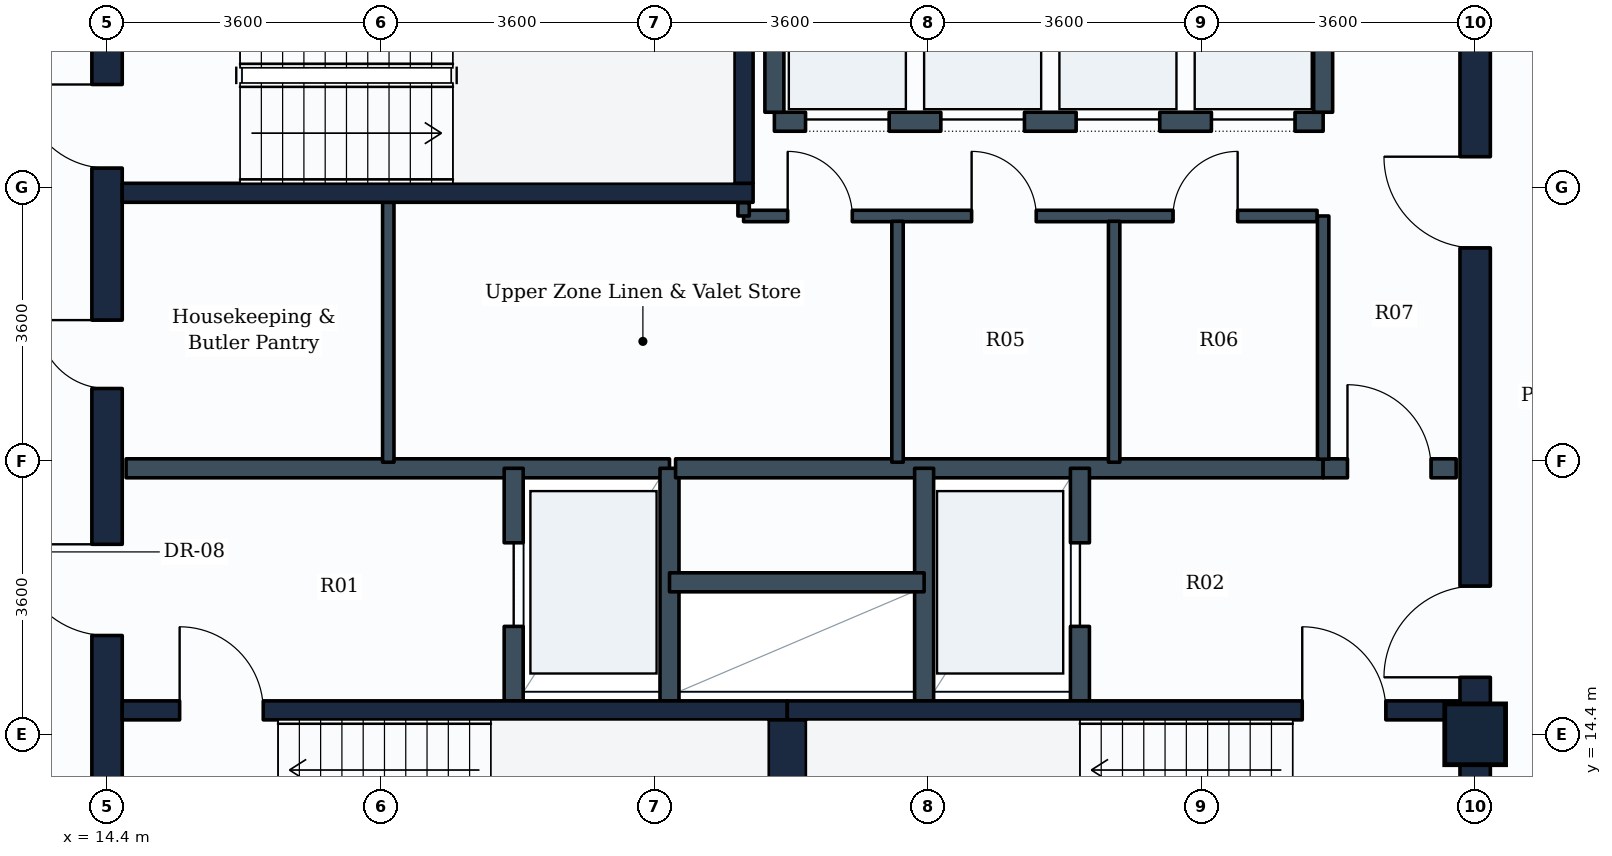
"""IFC4 building model, lengths in metres.
Left out: names, types, materials, properties, quantities, classifications, styles, units other than length and angle.
Written with IfcOpenShell. Run it as: python <this file> out.ifc"""

import sys

from ifc_helpers import new_model, si_unit, direction, frame, frame_2d, origin, origin_2d, place, context, subcontext, project, spatial, rectangle, extrude, element, fill, save


model = new_model("IFC4")
c1 = context("Model", 3, precision=1e-05, world=origin(), true_north=direction((0.0, 1.0)))
c2 = subcontext(c1, "Body", "Model", "MODEL_VIEW")
j1 = project(units=[si_unit("LENGTHUNIT", "METRE"), si_unit("PLANEANGLEUNIT", "RADIAN")], contexts=[c1])
p1 = place(None, origin())
s1 = spatial("IfcSite", under=j1, at=p1, CompositionType="ELEMENT")
p2 = place(p1, origin())
s2 = spatial("IfcBuilding", under=s1, at=p2, CompositionType="ELEMENT")
p3 = place(p2, frame((0.0, 0.0, 288.2)))
s3 = spatial("IfcBuildingStorey", under=s2, at=p3, CompositionType="ELEMENT", Elevation=288.2)
p4 = place(p3, frame((32.4, 14.4, 0.0), z_axis=(0.0, 0.0, 1.0), x_axis=(1.0, 0.0, 0.0)))
e1 = element("IfcColumn", 1, at=p4, inside=s3, PredefinedType="COLUMN", context=c2, shape_type="SweptSolid", body=[
    extrude(rectangle(XDim=0.8, YDim=0.8, at=origin_2d()), origin(), (0.0, 0.0, 1.0), 3.6),
])
p5 = place(p3, frame((14.4, 10.8, 0.0), z_axis=(0.0, 0.0, 1.0), x_axis=(0.0, 1.0, 0.0)))
e2 = element("IfcWall", 2, at=p5, inside=s3, PredefinedType="SHEAR", context=c2, shape_type="SweptSolid", body=[
    extrude(rectangle(XDim=14.4, YDim=0.4, at=frame_2d((7.2, 0.0))), origin(), (0.0, 0.0, 1.0), 3.35),
])
p6 = place(p5, frame((11.05, 0.0, 0.0)))
e3 = element("IfcOpeningElement", 3, at=p6, cuts=e2, PredefinedType="OPENING", context=c2, shape_type="SweptSolid", body=[
    extrude(rectangle(XDim=1.1, YDim=2.1, at=frame_2d((0.55, 1.05))), frame((0.0, 0.21, 0.0), z_axis=(0.0, -1.0, 0.0), x_axis=(1.0, 0.0, 0.0)), (0.0, 0.0, 1.0), 0.42),
])
p7 = place(p5, frame((4.9, 0.0, 0.0)))
e4 = element("IfcOpeningElement", 4, at=p7, cuts=e2, PredefinedType="OPENING", context=c2, shape_type="SweptSolid", body=[
    extrude(rectangle(XDim=1.2, YDim=2.1, at=frame_2d((0.6, 1.05))), frame((0.0, 0.21, 0.0), z_axis=(0.0, -1.0, 0.0), x_axis=(1.0, 0.0, 0.0)), (0.0, 0.0, 1.0), 0.42),
])
p8 = place(p5, frame((8.15, 0.0, 0.0)))
e5 = element("IfcOpeningElement", 5, at=p8, cuts=e2, PredefinedType="OPENING", context=c2, shape_type="SweptSolid", body=[
    extrude(rectangle(XDim=0.9, YDim=2.1, at=frame_2d((0.45, 1.05))), frame((0.0, 0.21, 0.0), z_axis=(0.0, -1.0, 0.0), x_axis=(1.0, 0.0, 0.0)), (0.0, 0.0, 1.0), 0.42),
])
p9 = place(p3, frame((32.4, 10.8, 0.0), z_axis=(0.0, 0.0, 1.0), x_axis=(0.0, 1.0, 0.0)))
e6 = element("IfcWall", 6, at=p9, inside=s3, PredefinedType="SHEAR", context=c2, shape_type="SweptSolid", body=[
    extrude(rectangle(XDim=14.4, YDim=0.4, at=frame_2d((7.2, 0.0))), origin(), (0.0, 0.0, 1.0), 3.35),
])
p10 = place(p9, frame((4.35, 0.0, 0.0)))
e7 = element("IfcOpeningElement", 7, at=p10, cuts=e6, PredefinedType="OPENING", context=c2, shape_type="SweptSolid", body=[
    extrude(rectangle(XDim=1.2, YDim=2.1, at=frame_2d((0.6, 1.05))), frame((0.0, 0.21, 0.0), z_axis=(0.0, -1.0, 0.0), x_axis=(1.0, 0.0, 0.0)), (0.0, 0.0, 1.0), 0.42),
])
p11 = place(p9, frame((10.0, 0.0, 0.0)))
e8 = element("IfcOpeningElement", 8, at=p11, cuts=e6, PredefinedType="OPENING", context=c2, shape_type="SweptSolid", body=[
    extrude(rectangle(XDim=1.2, YDim=2.1, at=frame_2d((0.6, 1.05))), frame((0.0, 0.21, 0.0), z_axis=(0.0, -1.0, 0.0), x_axis=(1.0, 0.0, 0.0)), (0.0, 0.0, 1.0), 0.42),
])
p12 = place(p3, frame((14.6, 14.715, 0.0), z_axis=(0.0, 0.0, 1.0), x_axis=(1.0, 0.0, 0.0)))
e9 = element("IfcWall", 9, at=p12, inside=s3, PredefinedType="SHEAR", context=c2, shape_type="SweptSolid", body=[
    extrude(rectangle(XDim=8.75, YDim=0.25, at=frame_2d((4.375, 0.0))), origin(), (0.0, 0.0, 1.0), 3.35),
])
p13 = place(p12, frame((0.755, 0.0, 0.0)))
e10 = element("IfcOpeningElement", 10, at=p13, cuts=e9, PredefinedType="OPENING", context=c2, shape_type="SweptSolid", body=[
    extrude(rectangle(XDim=1.1, YDim=2.1, at=frame_2d((0.55, 1.05))), frame((0.0, 0.135, 0.0), z_axis=(0.0, -1.0, 0.0), x_axis=(1.0, 0.0, 0.0)), (0.0, 0.0, 1.0), 0.27),
])
p14 = place(p3, frame((23.35, 14.715, 0.0), z_axis=(0.0, 0.0, 1.0), x_axis=(1.0, 0.0, 0.0)))
e11 = element("IfcWall", 11, at=p14, inside=s3, PredefinedType="SHEAR", context=c2, shape_type="SweptSolid", body=[
    extrude(rectangle(XDim=8.85, YDim=0.25, at=frame_2d((4.425, 0.0))), origin(), (0.0, 0.0, 1.0), 3.35),
])
p15 = place(p14, frame((6.775, 0.0, 0.0)))
e12 = element("IfcOpeningElement", 12, at=p15, cuts=e11, PredefinedType="OPENING", context=c2, shape_type="SweptSolid", body=[
    extrude(rectangle(XDim=1.1, YDim=2.1, at=frame_2d((0.55, 1.05))), frame((0.0, 0.135, 0.0), z_axis=(0.0, -1.0, 0.0), x_axis=(1.0, 0.0, 0.0)), (0.0, 0.0, 1.0), 0.27),
])
p16 = place(p3, frame((23.35, 11.75, 0.0), z_axis=(0.0, 0.0, 1.0), x_axis=(0.0, 1.0, 0.0)))
e13 = element("IfcWall", 13, at=p16, inside=s3, PredefinedType="SHEAR", context=c2, shape_type="SweptSolid", body=[
    extrude(rectangle(XDim=2.84, YDim=0.5, at=frame_2d((1.42, 0.0))), origin(), (0.0, 0.0, 1.0), 3.35),
])
p17 = place(p3, frame((14.6, 21.525, 0.0), z_axis=(0.0, 0.0, 1.0), x_axis=(1.0, 0.0, 0.0)))
e14 = element("IfcWall", 14, at=p17, inside=s3, PredefinedType="SHEAR", context=c2, shape_type="SweptSolid", body=[
    extrude(rectangle(XDim=8.3, YDim=0.25, at=frame_2d((4.15, 0.0))), origin(), (0.0, 0.0, 1.0), 3.35),
])
p18 = place(p3, frame((22.775, 21.65, 0.0), z_axis=(0.0, 0.0, 1.0), x_axis=(0.0, 1.0, 0.0)))
e15 = element("IfcWall", 15, at=p18, inside=s3, PredefinedType="SHEAR", context=c2, shape_type="SweptSolid", body=[
    extrude(rectangle(XDim=2.84, YDim=0.25, at=frame_2d((1.42, 0.0))), origin(), (0.0, 0.0, 1.0), 3.35),
])
p19 = place(p3, frame((14.65, 17.9, 0.0), z_axis=(0.0, 0.0, 1.0), x_axis=(1.0, 0.0, 0.0)))
e16 = element("IfcWall", 16, at=p19, inside=s3, PredefinedType="PARTITIONING", context=c2, shape_type="SweptSolid", body=[
    extrude(rectangle(XDim=7.15, YDim=0.25, at=frame_2d((3.575, 0.0))), origin(), (0.0, 0.0, 1.0), 3.335),
])
p20 = place(p3, frame((19.75, 14.84, 0.0), z_axis=(0.0, 0.0, 1.0), x_axis=(0.0, 1.0, 0.0)))
e17 = element("IfcWall", 17, at=p20, inside=s3, PredefinedType="PARTITIONING", context=c2, shape_type="SweptSolid", body=[
    extrude(rectangle(XDim=3.06, YDim=0.25, at=frame_2d((1.53, 0.0))), origin(), (0.0, 0.0, 1.0), 3.335),
])
p21 = place(p20, frame((0.98, 0.0, 0.0)))
e18 = element("IfcOpeningElement", 18, at=p21, cuts=e17, PredefinedType="OPENING", context=c2, shape_type="SweptSolid", body=[
    extrude(rectangle(XDim=1.1, YDim=2.1, at=frame_2d((0.55, 1.05))), frame((0.0, 0.135, 0.0), z_axis=(0.0, -1.0, 0.0), x_axis=(1.0, 0.0, 0.0)), (0.0, 0.0, 1.0), 0.27),
])
p22 = place(p3, frame((21.8, 14.84, 0.0), z_axis=(0.0, 0.0, 1.0), x_axis=(0.0, 1.0, 0.0)))
e19 = element("IfcWall", 19, at=p22, inside=s3, PredefinedType="PARTITIONING", context=c2, shape_type="SweptSolid", body=[
    extrude(rectangle(XDim=3.06, YDim=0.25, at=frame_2d((1.53, 0.0))), origin(), (0.0, 0.0, 1.0), 3.335),
])
p23 = place(p3, frame((21.88, 17.9, 0.0), z_axis=(0.0, 0.0, 1.0), x_axis=(1.0, 0.0, 0.0)))
e20 = element("IfcWall", 20, at=p23, inside=s3, PredefinedType="PARTITIONING", context=c2, shape_type="SweptSolid", body=[
    extrude(rectangle(XDim=8.52, YDim=0.25, at=frame_2d((4.26, 0.0))), origin(), (0.0, 0.0, 1.0), 3.335),
])
p24 = place(p3, frame((30.4, 17.9, 0.0), z_axis=(0.0, 0.0, 1.0), x_axis=(1.0, 0.0, 0.0)))
e21 = element("IfcWall", 21, at=p24, inside=s3, PredefinedType="PARTITIONING", context=c2, shape_type="SweptSolid", body=[
    extrude(rectangle(XDim=1.75, YDim=0.25, at=frame_2d((0.875, 0.0))), origin(), (0.0, 0.0, 1.0), 3.335),
])
p25 = place(p24, frame((0.32, 0.0, 0.0)))
e22 = element("IfcOpeningElement", 22, at=p25, cuts=e21, PredefinedType="OPENING", context=c2, shape_type="SweptSolid", body=[
    extrude(rectangle(XDim=1.1, YDim=2.1, at=frame_2d((0.55, 1.05))), frame((0.0, 0.135, 0.0), z_axis=(0.0, -1.0, 0.0), x_axis=(1.0, 0.0, 0.0)), (0.0, 0.0, 1.0), 0.27),
])
p26 = place(p3, frame((25.15, 14.84, 0.0), z_axis=(0.0, 0.0, 1.0), x_axis=(0.0, 1.0, 0.0)))
e23 = element("IfcWall", 23, at=p26, inside=s3, PredefinedType="PARTITIONING", context=c2, shape_type="SweptSolid", body=[
    extrude(rectangle(XDim=3.06, YDim=0.25, at=frame_2d((1.53, 0.0))), origin(), (0.0, 0.0, 1.0), 3.335),
])
p27 = place(p3, frame((27.2, 14.84, 0.0), z_axis=(0.0, 0.0, 1.0), x_axis=(0.0, 1.0, 0.0)))
e24 = element("IfcWall", 24, at=p27, inside=s3, PredefinedType="PARTITIONING", context=c2, shape_type="SweptSolid", body=[
    extrude(rectangle(XDim=3.06, YDim=0.25, at=frame_2d((1.53, 0.0))), origin(), (0.0, 0.0, 1.0), 3.335),
])
p28 = place(p27, frame((0.98, 0.0, 0.0)))
e25 = element("IfcOpeningElement", 25, at=p28, cuts=e24, PredefinedType="OPENING", context=c2, shape_type="SweptSolid", body=[
    extrude(rectangle(XDim=1.1, YDim=2.1, at=frame_2d((0.55, 1.05))), frame((0.0, 0.135, 0.0), z_axis=(0.0, -1.0, 0.0), x_axis=(1.0, 0.0, 0.0)), (0.0, 0.0, 1.0), 0.27),
])
p29 = place(p3, frame((21.8, 16.4, 0.0), z_axis=(0.0, 0.0, 1.0), x_axis=(1.0, 0.0, 0.0)))
e26 = element("IfcWall", 26, at=p29, inside=s3, PredefinedType="PARTITIONING", context=c2, shape_type="SweptSolid", body=[
    extrude(rectangle(XDim=3.35, YDim=0.25, at=frame_2d((1.675, 0.0))), origin(), (0.0, 0.0, 1.0), 3.335),
])
p30 = place(p3, frame((23.18, 22.46, 0.0), z_axis=(0.0, 0.0, 1.0), x_axis=(1.0, 0.0, 0.0)))
e27 = element("IfcWall", 27, at=p30, inside=s3, PredefinedType="PARTITIONING", context=c2, shape_type="SweptSolid", body=[
    extrude(rectangle(XDim=7.22, YDim=0.25, at=frame_2d((3.61, 0.0))), origin(), (0.0, 0.0, 1.0), 3.335),
])
p31 = place(p30, frame((0.41, 0.0, 0.0)))
e28 = element("IfcOpeningElement", 28, at=p31, cuts=e27, PredefinedType="OPENING", context=c2, shape_type="SweptSolid", body=[
    extrude(rectangle(XDim=1.1, YDim=2.1, at=frame_2d((0.55, 1.05))), frame((0.0, 0.135, 0.0), z_axis=(0.0, -1.0, 0.0), x_axis=(1.0, 0.0, 0.0)), (0.0, 0.0, 1.0), 0.27),
])
p32 = place(p30, frame((2.19, 0.0, 0.0)))
e29 = element("IfcOpeningElement", 29, at=p32, cuts=e27, PredefinedType="OPENING", context=c2, shape_type="SweptSolid", body=[
    extrude(rectangle(XDim=1.1, YDim=2.1, at=frame_2d((0.55, 1.05))), frame((0.0, 0.135, 0.0), z_axis=(0.0, -1.0, 0.0), x_axis=(1.0, 0.0, 0.0)), (0.0, 0.0, 1.0), 0.27),
])
p33 = place(p30, frame((3.97, 0.0, 0.0)))
e30 = element("IfcOpeningElement", 30, at=p33, cuts=e27, PredefinedType="OPENING", context=c2, shape_type="SweptSolid", body=[
    extrude(rectangle(XDim=1.1, YDim=2.1, at=frame_2d((0.55, 1.05))), frame((0.0, 0.135, 0.0), z_axis=(0.0, -1.0, 0.0), x_axis=(1.0, 0.0, 0.0)), (0.0, 0.0, 1.0), 0.27),
])
p34 = place(p30, frame((5.75, 0.0, 0.0)))
e31 = element("IfcOpeningElement", 31, at=p34, cuts=e27, PredefinedType="OPENING", context=c2, shape_type="SweptSolid", body=[
    extrude(rectangle(XDim=1.1, YDim=2.1, at=frame_2d((0.55, 1.05))), frame((0.0, 0.135, 0.0), z_axis=(0.0, -1.0, 0.0), x_axis=(1.0, 0.0, 0.0)), (0.0, 0.0, 1.0), 0.27),
])
for number, where, z_axis, x_axis in (
    (32, (23.18, 22.585, 0.0), (0.0, 0.0, 1.0), (0.0, 1.0, 0.0)),
    (33, (30.4, 22.585, 0.0), (0.0, 0.0, 1.0), (0.0, 1.0, 0.0)),
):
    element("IfcWall", number, at=place(p3, frame(where, z_axis=z_axis, x_axis=x_axis)), inside=s3, PredefinedType="PARTITIONING", context=c2, shape_type="SweptSolid", body=[
        extrude(rectangle(XDim=2.315, YDim=0.25, at=frame_2d((1.157, 0.0))), origin(), (0.0, 0.0, 1.0), 3.335),
    ])
p35 = place(p3, frame((22.775, 21.22, 0.0), z_axis=(0.0, 0.0, 1.0), x_axis=(1.0, 0.0, 0.0)))
e34 = element("IfcWall", 34, at=p35, inside=s3, PredefinedType="PARTITIONING", context=c2, shape_type="SweptSolid", body=[
    extrude(rectangle(XDim=7.545, YDim=0.15, at=frame_2d((3.772, 0.0))), origin(), (0.0, 0.0, 1.0), 3.335),
])
p36 = place(p35, frame((0.58, 0.0, 0.0)))
e35 = element("IfcOpeningElement", 35, at=p36, cuts=e34, PredefinedType="OPENING", context=c2, shape_type="SweptSolid", body=[
    extrude(rectangle(XDim=0.85, YDim=2.1, at=frame_2d((0.425, 1.05))), frame((0.0, 0.085, 0.0), z_axis=(0.0, -1.0, 0.0), x_axis=(1.0, 0.0, 0.0)), (0.0, 0.0, 1.0), 0.17),
])
p37 = place(p35, frame((3.0, 0.0, 0.0)))
e36 = element("IfcOpeningElement", 36, at=p37, cuts=e34, PredefinedType="OPENING", context=c2, shape_type="SweptSolid", body=[
    extrude(rectangle(XDim=0.85, YDim=2.1, at=frame_2d((0.425, 1.05))), frame((0.0, 0.085, 0.0), z_axis=(0.0, -1.0, 0.0), x_axis=(1.0, 0.0, 0.0)), (0.0, 0.0, 1.0), 0.17),
])
p38 = place(p35, frame((5.65, 0.0, 0.0)))
e37 = element("IfcOpeningElement", 37, at=p38, cuts=e34, PredefinedType="OPENING", context=c2, shape_type="SweptSolid", body=[
    extrude(rectangle(XDim=0.85, YDim=2.1, at=frame_2d((0.425, 1.05))), frame((0.0, 0.085, 0.0), z_axis=(0.0, -1.0, 0.0), x_axis=(1.0, 0.0, 0.0)), (0.0, 0.0, 1.0), 0.17),
])
p39 = place(p3, frame((22.775, 21.22, 0.0), z_axis=(0.0, 0.0, 1.0), x_axis=(0.0, 1.0, 0.0)))
e38 = element("IfcWall", 38, at=p39, inside=s3, PredefinedType="PARTITIONING", context=c2, shape_type="SweptSolid", body=[
    extrude(rectangle(XDim=0.175, YDim=0.15, at=frame_2d((0.087, 0.0))), origin(), (0.0, 0.0, 1.0), 3.335),
])
p40 = place(p3, frame((30.4, 18.02, 0.0), z_axis=(0.0, 0.0, 1.0), x_axis=(0.0, 1.0, 0.0)))
e39 = element("IfcWall", 39, at=p40, inside=s3, PredefinedType="PARTITIONING", context=c2, shape_type="SweptSolid", body=[
    extrude(rectangle(XDim=3.2, YDim=0.15, at=frame_2d((1.6, 0.0))), origin(), (0.0, 0.0, 1.0), 3.335),
])
p41 = place(p3, frame((18.1, 17.98, 0.0), z_axis=(0.0, 0.0, 1.0), x_axis=(0.0, 1.0, 0.0)))
e40 = element("IfcWall", 40, at=p41, inside=s3, PredefinedType="PARTITIONING", context=c2, shape_type="SweptSolid", body=[
    extrude(rectangle(XDim=3.42, YDim=0.15, at=frame_2d((1.71, 0.0))), origin(), (0.0, 0.0, 1.0), 3.335),
])
for number, where, z_axis, x_axis in (
    (41, (24.8, 17.98, 0.0), (0.0, 0.0, 1.0), (0.0, 1.0, 0.0)),
    (42, (27.65, 17.98, 0.0), (0.0, 0.0, 1.0), (0.0, 1.0, 0.0)),
):
    element("IfcWall", number, at=place(p3, frame(where, z_axis=z_axis, x_axis=x_axis)), inside=s3, PredefinedType="PARTITIONING", context=c2, shape_type="SweptSolid", body=[
        extrude(rectangle(XDim=3.17, YDim=0.15, at=frame_2d((1.585, 0.0))), origin(), (0.0, 0.0, 1.0), 3.335),
    ])
p42 = place(p13, origin())
e43 = element("IfcDoor", 43, at=p42, inside=s3, OperationType="SINGLE_SWING_LEFT", PredefinedType="DOOR", context=c2, shape_type="SweptSolid", body=[
    extrude(rectangle(XDim=1.1, YDim=2.1, at=frame_2d((0.55, 1.05))), frame((0.0, 0.025, 0.0), z_axis=(0.0, -1.0, 0.0), x_axis=(1.0, 0.0, 0.0)), (0.0, 0.0, 1.0), 0.05),
])
fill(e10, e43)
p43 = place(p15, origin())
e44 = element("IfcDoor", 44, at=p43, inside=s3, OperationType="SINGLE_SWING_LEFT", PredefinedType="DOOR", context=c2, shape_type="SweptSolid", body=[
    extrude(rectangle(XDim=1.1, YDim=2.1, at=frame_2d((0.55, 1.05))), frame((0.0, 0.025, 0.0), z_axis=(0.0, -1.0, 0.0), x_axis=(1.0, 0.0, 0.0)), (0.0, 0.0, 1.0), 0.05),
])
fill(e12, e44)
p44 = place(p6, origin())
e45 = element("IfcDoor", 45, at=p44, inside=s3, OperationType="SINGLE_SWING_RIGHT", PredefinedType="DOOR", context=c2, shape_type="SweptSolid", body=[
    extrude(rectangle(XDim=1.1, YDim=2.1, at=frame_2d((0.55, 1.05))), frame((0.0, 0.025, 0.0), z_axis=(0.0, -1.0, 0.0), x_axis=(1.0, 0.0, 0.0)), (0.0, 0.0, 1.0), 0.05),
])
fill(e3, e45)
p45 = place(p21, origin())
e46 = element("IfcDoor", 46, at=p45, inside=s3, OperationType="SLIDING_TO_LEFT", PredefinedType="DOOR", context=c2, shape_type="SweptSolid", body=[
    extrude(rectangle(XDim=1.1, YDim=2.1, at=frame_2d((0.55, 1.05))), frame((0.0, 0.025, 0.0), z_axis=(0.0, -1.0, 0.0), x_axis=(1.0, 0.0, 0.0)), (0.0, 0.0, 1.0), 0.05),
])
fill(e18, e46)
p46 = place(p28, origin())
e47 = element("IfcDoor", 47, at=p46, inside=s3, OperationType="SLIDING_TO_LEFT", PredefinedType="DOOR", context=c2, shape_type="SweptSolid", body=[
    extrude(rectangle(XDim=1.1, YDim=2.1, at=frame_2d((0.55, 1.05))), frame((0.0, 0.025, 0.0), z_axis=(0.0, -1.0, 0.0), x_axis=(1.0, 0.0, 0.0)), (0.0, 0.0, 1.0), 0.05),
])
fill(e25, e47)
p47 = place(p7, origin())
e48 = element("IfcDoor", 48, at=p47, inside=s3, OperationType="SINGLE_SWING_RIGHT", PredefinedType="DOOR", context=c2, shape_type="SweptSolid", body=[
    extrude(rectangle(XDim=1.2, YDim=2.1, at=frame_2d((0.6, 1.05))), frame((0.0, 0.025, 0.0), z_axis=(0.0, -1.0, 0.0), x_axis=(1.0, 0.0, 0.0)), (0.0, 0.0, 1.0), 0.05),
])
fill(e4, e48)
p48 = place(p10, origin())
e49 = element("IfcDoor", 49, at=p48, inside=s3, OperationType="SINGLE_SWING_LEFT", PredefinedType="DOOR", context=c2, shape_type="SweptSolid", body=[
    extrude(rectangle(XDim=1.2, YDim=2.1, at=frame_2d((0.6, 1.05))), frame((0.0, 0.025, 0.0), z_axis=(0.0, -1.0, 0.0), x_axis=(1.0, 0.0, 0.0)), (0.0, 0.0, 1.0), 0.05),
])
fill(e7, e49)
p49 = place(p25, origin())
e50 = element("IfcDoor", 50, at=p49, inside=s3, OperationType="SINGLE_SWING_LEFT", PredefinedType="DOOR", context=c2, shape_type="SweptSolid", body=[
    extrude(rectangle(XDim=1.1, YDim=2.1, at=frame_2d((0.55, 1.05))), frame((0.0, 0.025, 0.0), z_axis=(0.0, -1.0, 0.0), x_axis=(1.0, 0.0, 0.0)), (0.0, 0.0, 1.0), 0.05),
])
fill(e22, e50)
p50 = place(p31, origin())
e51 = element("IfcDoor", 51, at=p50, inside=s3, OperationType="SLIDING_TO_LEFT", PredefinedType="DOOR", context=c2, shape_type="SweptSolid", body=[
    extrude(rectangle(XDim=1.1, YDim=2.1, at=frame_2d((0.55, 1.05))), frame((0.0, 0.025, 0.0), z_axis=(0.0, -1.0, 0.0), x_axis=(1.0, 0.0, 0.0)), (0.0, 0.0, 1.0), 0.05),
])
fill(e28, e51)
p51 = place(p32, origin())
e52 = element("IfcDoor", 52, at=p51, inside=s3, OperationType="SLIDING_TO_LEFT", PredefinedType="DOOR", context=c2, shape_type="SweptSolid", body=[
    extrude(rectangle(XDim=1.1, YDim=2.1, at=frame_2d((0.55, 1.05))), frame((0.0, 0.025, 0.0), z_axis=(0.0, -1.0, 0.0), x_axis=(1.0, 0.0, 0.0)), (0.0, 0.0, 1.0), 0.05),
])
fill(e29, e52)
p52 = place(p33, origin())
e53 = element("IfcDoor", 53, at=p52, inside=s3, OperationType="SLIDING_TO_LEFT", PredefinedType="DOOR", context=c2, shape_type="SweptSolid", body=[
    extrude(rectangle(XDim=1.1, YDim=2.1, at=frame_2d((0.55, 1.05))), frame((0.0, 0.025, 0.0), z_axis=(0.0, -1.0, 0.0), x_axis=(1.0, 0.0, 0.0)), (0.0, 0.0, 1.0), 0.05),
])
fill(e30, e53)
p53 = place(p34, origin())
e54 = element("IfcDoor", 54, at=p53, inside=s3, OperationType="SLIDING_TO_LEFT", PredefinedType="DOOR", context=c2, shape_type="SweptSolid", body=[
    extrude(rectangle(XDim=1.1, YDim=2.1, at=frame_2d((0.55, 1.05))), frame((0.0, 0.025, 0.0), z_axis=(0.0, -1.0, 0.0), x_axis=(1.0, 0.0, 0.0)), (0.0, 0.0, 1.0), 0.05),
])
fill(e31, e54)
p54 = place(p11, origin())
e55 = element("IfcDoor", 55, at=p54, inside=s3, OperationType="SINGLE_SWING_RIGHT", PredefinedType="DOOR", context=c2, shape_type="SweptSolid", body=[
    extrude(rectangle(XDim=1.2, YDim=2.1, at=frame_2d((0.6, 1.05))), frame((0.0, 0.025, 0.0), z_axis=(0.0, -1.0, 0.0), x_axis=(1.0, 0.0, 0.0)), (0.0, 0.0, 1.0), 0.05),
])
fill(e8, e55)
p55 = place(p8, origin())
e56 = element("IfcDoor", 56, at=p55, inside=s3, OperationType="SINGLE_SWING_RIGHT", PredefinedType="DOOR", context=c2, shape_type="SweptSolid", body=[
    extrude(rectangle(XDim=0.9, YDim=2.1, at=frame_2d((0.45, 1.05))), frame((0.0, 0.025, 0.0), z_axis=(0.0, -1.0, 0.0), x_axis=(1.0, 0.0, 0.0)), (0.0, 0.0, 1.0), 0.05),
])
fill(e5, e56)
p56 = place(p36, origin())
e57 = element("IfcDoor", 57, at=p56, inside=s3, OperationType="SINGLE_SWING_LEFT", PredefinedType="DOOR", context=c2, shape_type="SweptSolid", body=[
    extrude(rectangle(XDim=0.85, YDim=2.1, at=frame_2d((0.425, 1.05))), frame((0.0, 0.025, 0.0), z_axis=(0.0, -1.0, 0.0), x_axis=(1.0, 0.0, 0.0)), (0.0, 0.0, 1.0), 0.05),
])
fill(e35, e57)
p57 = place(p37, origin())
e58 = element("IfcDoor", 58, at=p57, inside=s3, OperationType="SINGLE_SWING_LEFT", PredefinedType="DOOR", context=c2, shape_type="SweptSolid", body=[
    extrude(rectangle(XDim=0.85, YDim=2.1, at=frame_2d((0.425, 1.05))), frame((0.0, 0.025, 0.0), z_axis=(0.0, -1.0, 0.0), x_axis=(1.0, 0.0, 0.0)), (0.0, 0.0, 1.0), 0.05),
])
fill(e36, e58)
p58 = place(p38, origin())
e59 = element("IfcDoor", 59, at=p58, inside=s3, OperationType="SINGLE_SWING_RIGHT", PredefinedType="DOOR", context=c2, shape_type="SweptSolid", body=[
    extrude(rectangle(XDim=0.85, YDim=2.1, at=frame_2d((0.425, 1.05))), frame((0.0, 0.025, 0.0), z_axis=(0.0, -1.0, 0.0), x_axis=(1.0, 0.0, 0.0)), (0.0, 0.0, 1.0), 0.05),
])
fill(e37, e59)
save(model, sys.argv[1])
